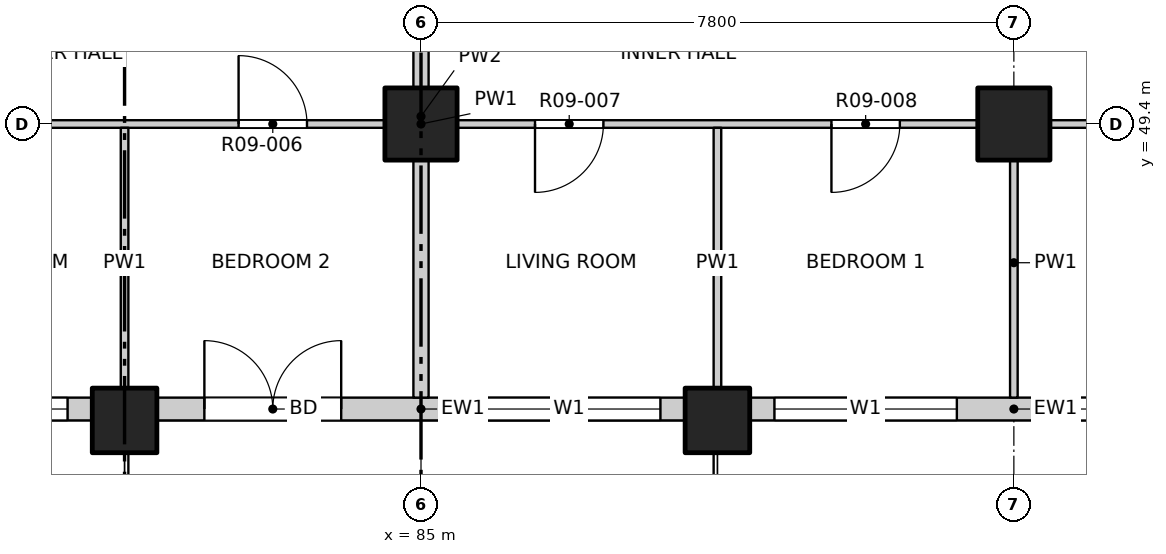
"""IFC4 building model, lengths in metres.
Left out: names, types, materials, properties, quantities, classifications, styles, units other than length and angle.
Written with IfcOpenShell. Run it as: python <this file> out.ifc"""

import sys

from ifc_helpers import new_model, si_unit, direction, frame, frame_2d, origin, origin_2d, place, context, subcontext, project, spatial, rectangle, extrude, element, fill, save


model = new_model("IFC4")
c1 = context("Model", 3, precision=1e-05, world=origin(), true_north=direction((0.0, 1.0)))
c2 = subcontext(c1, "Body", "Model", "MODEL_VIEW")
j1 = project(units=[si_unit("LENGTHUNIT", "METRE"), si_unit("PLANEANGLEUNIT", "RADIAN")], contexts=[c1])
p1 = place(None, origin())
s1 = spatial("IfcSite", under=j1, at=p1, CompositionType="ELEMENT")
p2 = place(p1, origin())
s2 = spatial("IfcBuilding", under=s1, at=p2, CompositionType="ELEMENT")
p3 = place(p2, frame((0.0, 0.0, 113.5)))
s3 = spatial("IfcBuildingStorey", under=s2, at=p3, CompositionType="ELEMENT", Elevation=113.5)
for number, where, z_axis, x_axis in (
    (1, (81.1, 45.5, -0.25), (0.0, 0.0, 1.0), (1.0, 0.0, 0.0)),
    (2, (88.9, 45.5, -0.25), (0.0, 0.0, 1.0), (1.0, 0.0, 0.0)),
):
    element("IfcColumn", number, at=place(p3, frame(where, z_axis=z_axis, x_axis=x_axis)), inside=s3, PredefinedType="COLUMN", context=c2, shape_type="SweptSolid", body=[
        extrude(rectangle(XDim=0.85, YDim=0.85, at=origin_2d()), origin(), (0.0, 0.0, 1.0), 3.35),
    ])
for number, where, z_axis, x_axis in (
    (3, (85.0, 49.4, -0.25), (0.0, 0.0, 1.0), (1.0, 0.0, 0.0)),
    (4, (92.8, 49.4, -0.25), (0.0, 0.0, 1.0), (1.0, 0.0, 0.0)),
):
    element("IfcColumn", number, at=place(p3, frame(where, z_axis=z_axis, x_axis=x_axis)), inside=s3, PredefinedType="COLUMN", context=c2, shape_type="SweptSolid", body=[
        extrude(rectangle(XDim=0.95, YDim=0.95, at=origin_2d()), origin(), (0.0, 0.0, 1.0), 3.35),
    ])
p4 = place(p3, frame((73.725, 45.65, 0.0), z_axis=(0.0, 0.0, 1.0), x_axis=(1.0, 0.0, 0.0)))
e5 = element("IfcWall", 5, at=p4, inside=s3, PredefinedType="SOLIDWALL", context=c2, shape_type="SweptSolid", body=[
    extrude(rectangle(XDim=6.95, YDim=0.3, at=frame_2d((3.475, 0.0))), origin(), (0.0, 0.0, 1.0), 3.1),
])
p5 = place(p4, frame((0.325, 0.0, 0.9)))
e6 = element("IfcOpeningElement", 6, at=p5, cuts=e5, PredefinedType="OPENING", context=c2, shape_type="SweptSolid", body=[
    extrude(rectangle(XDim=2.4, YDim=1.8, at=frame_2d((1.2, 0.9))), frame((0.0, 0.16, 0.0), z_axis=(0.0, -1.0, 0.0), x_axis=(1.0, 0.0, 0.0)), (0.0, 0.0, 1.0), 0.32),
])
p6 = place(p4, frame((4.225, 0.0, 0.9)))
e7 = element("IfcOpeningElement", 7, at=p6, cuts=e5, PredefinedType="OPENING", context=c2, shape_type="SweptSolid", body=[
    extrude(rectangle(XDim=2.4, YDim=1.8, at=frame_2d((1.2, 0.9))), frame((0.0, 0.16, 0.0), z_axis=(0.0, -1.0, 0.0), x_axis=(1.0, 0.0, 0.0)), (0.0, 0.0, 1.0), 0.32),
])
p7 = place(p3, frame((81.525, 45.65, 0.0), z_axis=(0.0, 0.0, 1.0), x_axis=(1.0, 0.0, 0.0)))
e8 = element("IfcWall", 8, at=p7, inside=s3, PredefinedType="SOLIDWALL", context=c2, shape_type="SweptSolid", body=[
    extrude(rectangle(XDim=6.95, YDim=0.3, at=frame_2d((3.475, 0.0))), origin(), (0.0, 0.0, 1.0), 3.1),
])
p8 = place(p7, frame((0.625, 0.0, 0.0)))
e9 = element("IfcOpeningElement", 9, at=p8, cuts=e8, PredefinedType="OPENING", context=c2, shape_type="SweptSolid", body=[
    extrude(rectangle(XDim=1.8, YDim=2.4, at=frame_2d((0.9, 1.2))), frame((0.0, 0.16, 0.0), z_axis=(0.0, -1.0, 0.0), x_axis=(1.0, 0.0, 0.0)), (0.0, 0.0, 1.0), 0.32),
])
p9 = place(p7, frame((4.225, 0.0, 0.9)))
e10 = element("IfcOpeningElement", 10, at=p9, cuts=e8, PredefinedType="OPENING", context=c2, shape_type="SweptSolid", body=[
    extrude(rectangle(XDim=2.4, YDim=1.8, at=frame_2d((1.2, 0.9))), frame((0.0, 0.16, 0.0), z_axis=(0.0, -1.0, 0.0), x_axis=(1.0, 0.0, 0.0)), (0.0, 0.0, 1.0), 0.32),
])
p10 = place(p3, frame((89.325, 45.65, 0.0), z_axis=(0.0, 0.0, 1.0), x_axis=(1.0, 0.0, 0.0)))
e11 = element("IfcWall", 11, at=p10, inside=s3, PredefinedType="SOLIDWALL", context=c2, shape_type="SweptSolid", body=[
    extrude(rectangle(XDim=6.95, YDim=0.3, at=frame_2d((3.475, 0.0))), origin(), (0.0, 0.0, 1.0), 3.1),
])
p11 = place(p10, frame((0.325, 0.0, 0.9)))
e12 = element("IfcOpeningElement", 12, at=p11, cuts=e11, PredefinedType="OPENING", context=c2, shape_type="SweptSolid", body=[
    extrude(rectangle(XDim=2.4, YDim=1.8, at=frame_2d((1.2, 0.9))), frame((0.0, 0.16, 0.0), z_axis=(0.0, -1.0, 0.0), x_axis=(1.0, 0.0, 0.0)), (0.0, 0.0, 1.0), 0.32),
])
p12 = place(p10, frame((4.225, 0.0, 0.9)))
e13 = element("IfcOpeningElement", 13, at=p12, cuts=e11, PredefinedType="OPENING", context=c2, shape_type="SweptSolid", body=[
    extrude(rectangle(XDim=2.4, YDim=1.8, at=frame_2d((1.2, 0.9))), frame((0.0, 0.16, 0.0), z_axis=(0.0, -1.0, 0.0), x_axis=(1.0, 0.0, 0.0)), (0.0, 0.0, 1.0), 0.32),
])
p13 = place(p3, frame((65.8, 49.4, 0.0), z_axis=(0.0, 0.0, 1.0), x_axis=(1.0, 0.0, 0.0)))
e14 = element("IfcWall", 14, at=p13, inside=s3, PredefinedType="PARTITIONING", context=c2, shape_type="SweptSolid", body=[
    extrude(rectangle(XDim=38.4, YDim=0.1, at=frame_2d((19.2, 0.0))), origin(), (0.0, 0.0, 1.0), 3.1),
])
p14 = place(p13, frame((4.19, 0.0, 0.0)))
e15 = element("IfcOpeningElement", 15, at=p14, cuts=e14, PredefinedType="OPENING", context=c2, shape_type="SweptSolid", body=[
    extrude(rectangle(XDim=0.9, YDim=2.1, at=frame_2d((0.45, 1.05))), frame((0.0, 0.06, 0.0), z_axis=(0.0, -1.0, 0.0), x_axis=(1.0, 0.0, 0.0)), (0.0, 0.0, 1.0), 0.12),
])
p15 = place(p13, frame((9.0, 0.0, 0.0)))
e16 = element("IfcOpeningElement", 16, at=p15, cuts=e14, PredefinedType="OPENING", context=c2, shape_type="SweptSolid", body=[
    extrude(rectangle(XDim=0.9, YDim=2.1, at=frame_2d((0.45, 1.05))), frame((0.0, 0.06, 0.0), z_axis=(0.0, -1.0, 0.0), x_axis=(1.0, 0.0, 0.0)), (0.0, 0.0, 1.0), 0.12),
])
p16 = place(p13, frame((12.9, 0.0, 0.0)))
e17 = element("IfcOpeningElement", 17, at=p16, cuts=e14, PredefinedType="OPENING", context=c2, shape_type="SweptSolid", body=[
    extrude(rectangle(XDim=0.9, YDim=2.1, at=frame_2d((0.45, 1.05))), frame((0.0, 0.06, 0.0), z_axis=(0.0, -1.0, 0.0), x_axis=(1.0, 0.0, 0.0)), (0.0, 0.0, 1.0), 0.12),
])
p17 = place(p13, frame((16.8, 0.0, 0.0)))
e18 = element("IfcOpeningElement", 18, at=p17, cuts=e14, PredefinedType="OPENING", context=c2, shape_type="SweptSolid", body=[
    extrude(rectangle(XDim=0.9, YDim=2.1, at=frame_2d((0.45, 1.05))), frame((0.0, 0.06, 0.0), z_axis=(0.0, -1.0, 0.0), x_axis=(1.0, 0.0, 0.0)), (0.0, 0.0, 1.0), 0.12),
])
p18 = place(p13, frame((20.7, 0.0, 0.0)))
e19 = element("IfcOpeningElement", 19, at=p18, cuts=e14, PredefinedType="OPENING", context=c2, shape_type="SweptSolid", body=[
    extrude(rectangle(XDim=0.9, YDim=2.1, at=frame_2d((0.45, 1.05))), frame((0.0, 0.06, 0.0), z_axis=(0.0, -1.0, 0.0), x_axis=(1.0, 0.0, 0.0)), (0.0, 0.0, 1.0), 0.12),
])
p19 = place(p13, frame((24.6, 0.0, 0.0)))
e20 = element("IfcOpeningElement", 20, at=p19, cuts=e14, PredefinedType="OPENING", context=c2, shape_type="SweptSolid", body=[
    extrude(rectangle(XDim=0.9, YDim=2.1, at=frame_2d((0.45, 1.05))), frame((0.0, 0.06, 0.0), z_axis=(0.0, -1.0, 0.0), x_axis=(1.0, 0.0, 0.0)), (0.0, 0.0, 1.0), 0.12),
])
p20 = place(p13, frame((28.5, 0.0, 0.0)))
e21 = element("IfcOpeningElement", 21, at=p20, cuts=e14, PredefinedType="OPENING", context=c2, shape_type="SweptSolid", body=[
    extrude(rectangle(XDim=0.9, YDim=2.1, at=frame_2d((0.45, 1.05))), frame((0.0, 0.06, 0.0), z_axis=(0.0, -1.0, 0.0), x_axis=(1.0, 0.0, 0.0)), (0.0, 0.0, 1.0), 0.12),
])
p21 = place(p13, frame((33.31, 0.0, 0.0)))
e22 = element("IfcOpeningElement", 22, at=p21, cuts=e14, PredefinedType="OPENING", context=c2, shape_type="SweptSolid", body=[
    extrude(rectangle(XDim=0.9, YDim=2.1, at=frame_2d((0.45, 1.05))), frame((0.0, 0.06, 0.0), z_axis=(0.0, -1.0, 0.0), x_axis=(1.0, 0.0, 0.0)), (0.0, 0.0, 1.0), 0.12),
])
p22 = place(p3, frame((81.1, 45.8, 0.0), z_axis=(0.0, 0.0, 1.0), x_axis=(0.0, 1.0, 0.0)))
e23 = element("IfcWall", 23, at=p22, inside=s3, PredefinedType="PARTITIONING", context=c2, shape_type="SweptSolid", body=[
    extrude(rectangle(XDim=3.55, YDim=0.1, at=frame_2d((1.775, 0.0))), origin(), (0.0, 0.0, 1.0), 3.1),
])
p23 = place(p3, frame((85.0, 45.8, 0.0), z_axis=(0.0, 0.0, 1.0), x_axis=(0.0, 1.0, 0.0)))
e24 = element("IfcWall", 24, at=p23, inside=s3, PredefinedType="PARTITIONING", context=c2, shape_type="SweptSolid", body=[
    extrude(rectangle(XDim=7.4, YDim=0.2, at=frame_2d((3.7, 0.0))), origin(), (0.0, 0.0, 1.0), 3.1),
])
for number, where, z_axis, x_axis in (
    (25, (88.9, 45.8, 0.0), (0.0, 0.0, 1.0), (0.0, 1.0, 0.0)),
    (26, (92.8, 45.8, 0.0), (0.0, 0.0, 1.0), (0.0, 1.0, 0.0)),
):
    element("IfcWall", number, at=place(p3, frame(where, z_axis=z_axis, x_axis=x_axis)), inside=s3, PredefinedType="PARTITIONING", context=c2, shape_type="SweptSolid", body=[
        extrude(rectangle(XDim=3.55, YDim=0.1, at=frame_2d((1.775, 0.0))), origin(), (0.0, 0.0, 1.0), 3.1),
    ])
p24 = place(p6, origin())
e27 = element("IfcWindow", 27, at=p24, inside=s3, PartitioningType="DOUBLE_PANEL_VERTICAL", PredefinedType="WINDOW", context=c2, shape_type="SweptSolid", body=[
    extrude(rectangle(XDim=2.4, YDim=1.8, at=frame_2d((1.2, 0.9))), frame((0.0, 0.03, 0.0), z_axis=(0.0, -1.0, 0.0), x_axis=(1.0, 0.0, 0.0)), (0.0, 0.0, 1.0), 0.06),
])
fill(e7, e27)
p25 = place(p8, origin())
e28 = element("IfcDoor", 28, at=p25, inside=s3, OperationType="DOUBLE_DOOR_SINGLE_SWING", PredefinedType="DOOR", context=c2, shape_type="SweptSolid", body=[
    extrude(rectangle(XDim=1.8, YDim=2.4, at=frame_2d((0.9, 1.2))), frame((0.0, 0.025, 0.0), z_axis=(0.0, -1.0, 0.0), x_axis=(1.0, 0.0, 0.0)), (0.0, 0.0, 1.0), 0.05),
])
fill(e9, e28)
p26 = place(p9, origin())
e29 = element("IfcWindow", 29, at=p26, inside=s3, PartitioningType="DOUBLE_PANEL_VERTICAL", PredefinedType="WINDOW", context=c2, shape_type="SweptSolid", body=[
    extrude(rectangle(XDim=2.4, YDim=1.8, at=frame_2d((1.2, 0.9))), frame((0.0, 0.03, 0.0), z_axis=(0.0, -1.0, 0.0), x_axis=(1.0, 0.0, 0.0)), (0.0, 0.0, 1.0), 0.06),
])
fill(e10, e29)
p27 = place(p11, origin())
e30 = element("IfcWindow", 30, at=p27, inside=s3, PartitioningType="DOUBLE_PANEL_VERTICAL", PredefinedType="WINDOW", context=c2, shape_type="SweptSolid", body=[
    extrude(rectangle(XDim=2.4, YDim=1.8, at=frame_2d((1.2, 0.9))), frame((0.0, 0.03, 0.0), z_axis=(0.0, -1.0, 0.0), x_axis=(1.0, 0.0, 0.0)), (0.0, 0.0, 1.0), 0.06),
])
fill(e12, e30)
p28 = place(p12, origin())
e31 = element("IfcWindow", 31, at=p28, inside=s3, PartitioningType="DOUBLE_PANEL_VERTICAL", PredefinedType="WINDOW", context=c2, shape_type="SweptSolid", body=[
    extrude(rectangle(XDim=2.4, YDim=1.8, at=frame_2d((1.2, 0.9))), frame((0.0, 0.03, 0.0), z_axis=(0.0, -1.0, 0.0), x_axis=(1.0, 0.0, 0.0)), (0.0, 0.0, 1.0), 0.06),
])
fill(e13, e31)
p29 = place(p17, origin())
e32 = element("IfcDoor", 32, at=p29, inside=s3, OperationType="SINGLE_SWING_LEFT", PredefinedType="DOOR", context=c2, shape_type="SweptSolid", body=[
    extrude(rectangle(XDim=0.9, YDim=2.1, at=frame_2d((0.45, 1.05))), frame((0.0, 0.025, 0.0), z_axis=(0.0, -1.0, 0.0), x_axis=(1.0, 0.0, 0.0)), (0.0, 0.0, 1.0), 0.05),
])
fill(e18, e32)
p30 = place(p18, origin())
e33 = element("IfcDoor", 33, at=p30, inside=s3, OperationType="SINGLE_SWING_RIGHT", PredefinedType="DOOR", context=c2, shape_type="SweptSolid", body=[
    extrude(rectangle(XDim=0.9, YDim=2.1, at=frame_2d((0.45, 1.05))), frame((0.0, 0.025, 0.0), z_axis=(0.0, -1.0, 0.0), x_axis=(1.0, 0.0, 0.0)), (0.0, 0.0, 1.0), 0.05),
])
fill(e19, e33)
p31 = place(p19, origin())
e34 = element("IfcDoor", 34, at=p31, inside=s3, OperationType="SINGLE_SWING_RIGHT", PredefinedType="DOOR", context=c2, shape_type="SweptSolid", body=[
    extrude(rectangle(XDim=0.9, YDim=2.1, at=frame_2d((0.45, 1.05))), frame((0.0, 0.025, 0.0), z_axis=(0.0, -1.0, 0.0), x_axis=(1.0, 0.0, 0.0)), (0.0, 0.0, 1.0), 0.05),
])
fill(e20, e34)
save(model, sys.argv[1])
